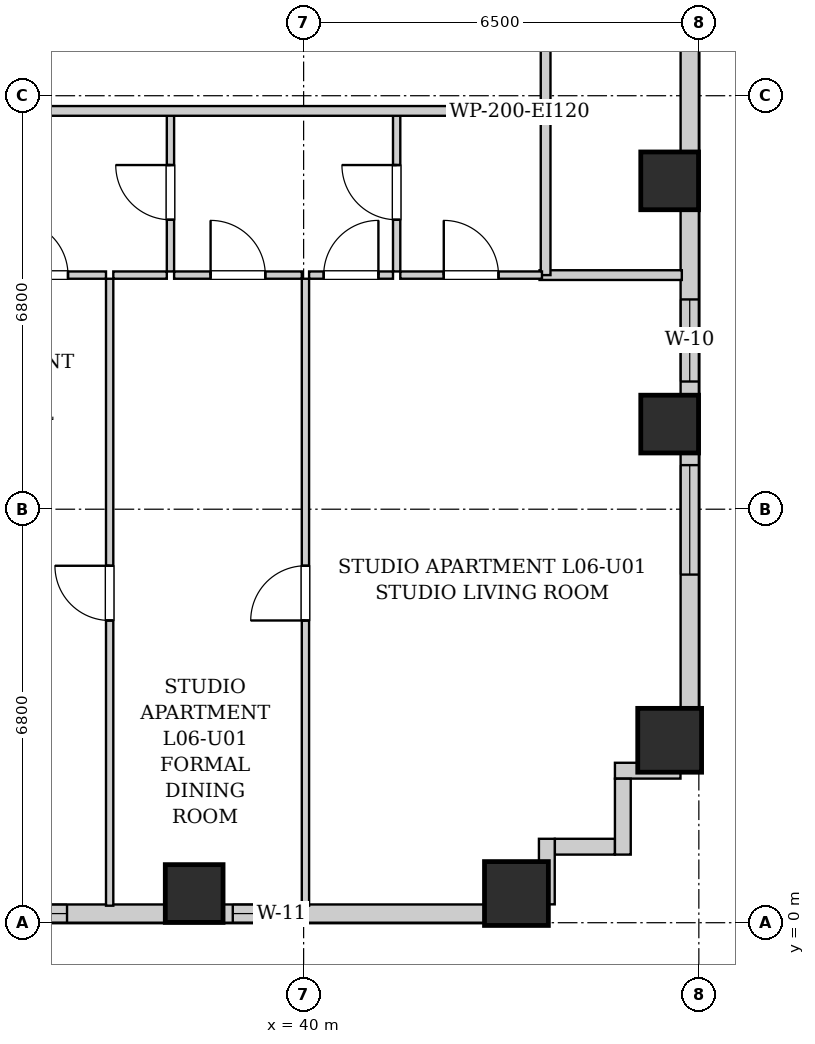
"""IFC4 building model, lengths in metres.
Left out: names, types, materials, properties, quantities, classifications, styles, units other than length and angle.
Written with IfcOpenShell. Run it as: python <this file> out.ifc"""

import sys

from ifc_helpers import new_model, si_unit, direction, frame, frame_2d, origin, origin_2d, place, context, subcontext, project, spatial, rectangle, extrude, element, fill, save


model = new_model("IFC4")
c1 = context("Model", 3, precision=1e-05, world=origin(), true_north=direction((0.0, 1.0)))
c2 = subcontext(c1, "Body", "Model", "MODEL_VIEW")
j1 = project(units=[si_unit("LENGTHUNIT", "METRE"), si_unit("PLANEANGLEUNIT", "RADIAN")], contexts=[c1])
p1 = place(None, origin())
s1 = spatial("IfcSite", under=j1, at=p1, CompositionType="ELEMENT")
p2 = place(p1, origin())
s2 = spatial("IfcBuilding", under=s1, at=p2, CompositionType="ELEMENT")
p3 = place(p2, frame((0.0, 0.0, 29.0)))
s3 = spatial("IfcBuildingStorey", under=s2, at=p3, CompositionType="ELEMENT", Elevation=29.0)
p4 = place(p3, frame((38.2, 0.48, 0.0), z_axis=(0.0, 0.0, 1.0), x_axis=(1.0, 0.0, 0.0)))
e1 = element("IfcColumn", 1, at=p4, inside=s3, PredefinedType="COLUMN", context=c2, shape_type="SweptSolid", body=[
    extrude(rectangle(XDim=0.95, YDim=0.95, at=origin_2d()), origin(), (0.0, 0.0, 1.0), 3.2),
])
for number, where, z_axis, x_axis in (
    (2, (43.5, 0.48, 0.0), (0.0, 0.0, 1.0), (1.0, 0.0, 0.0)),
    (3, (46.02, 3.0, 0.0), (0.0, 0.0, 1.0), (1.0, 0.0, 0.0)),
):
    element("IfcColumn", number, at=place(p3, frame(where, z_axis=z_axis, x_axis=x_axis)), inside=s3, PredefinedType="COLUMN", context=c2, shape_type="SweptSolid", body=[
        extrude(rectangle(XDim=1.05, YDim=1.05, at=origin_2d()), origin(), (0.0, 0.0, 1.0), 3.2),
    ])
for number, where, z_axis, x_axis in (
    (4, (46.02, 8.2, 0.0), (0.0, 0.0, 1.0), (1.0, 0.0, 0.0)),
    (5, (46.02, 12.2, 0.0), (0.0, 0.0, 1.0), (1.0, 0.0, 0.0)),
):
    element("IfcColumn", number, at=place(p3, frame(where, z_axis=z_axis, x_axis=x_axis)), inside=s3, PredefinedType="COLUMN", context=c2, shape_type="SweptSolid", body=[
        extrude(rectangle(XDim=0.95, YDim=0.95, at=origin_2d()), origin(), (0.0, 0.0, 1.0), 3.2),
    ])
p5 = place(p3, frame((46.35, 45.1, 0.0), z_axis=(0.0, 0.0, 1.0), x_axis=(0.0, -1.0, 0.0)))
e6 = element("IfcWall", 6, at=p5, inside=s3, PredefinedType="SOLIDWALL", context=c2, shape_type="SweptSolid", body=[
    extrude(rectangle(XDim=42.6, YDim=0.3, at=frame_2d((21.3, 0.0))), origin(), (0.0, 0.0, 1.0), 1.975),
])
p6 = place(p5, frame((37.575, 0.0, 0.55)))
e7 = element("IfcOpeningElement", 7, at=p6, cuts=e6, PredefinedType="OPENING", context=c2, shape_type="SweptSolid", body=[
    extrude(rectangle(XDim=1.8, YDim=1.2, at=frame_2d((0.9, 0.6))), frame((0.0, 0.16, 0.0), z_axis=(0.0, -1.0, 0.0), x_axis=(1.0, 0.0, 0.0)), (0.0, 0.0, 1.0), 0.32),
])
p7 = place(p5, frame((34.85, 0.0, 0.55)))
e8 = element("IfcOpeningElement", 8, at=p7, cuts=e6, PredefinedType="OPENING", context=c2, shape_type="SweptSolid", body=[
    extrude(rectangle(XDim=1.35, YDim=1.2, at=frame_2d((0.675, 0.6))), frame((0.0, 0.16, 0.0), z_axis=(0.0, -1.0, 0.0), x_axis=(1.0, 0.0, 0.0)), (0.0, 0.0, 1.0), 0.32),
])
p8 = place(p5, frame((3.665, 0.0, 0.55)))
e9 = element("IfcOpeningElement", 9, at=p8, cuts=e6, PredefinedType="OPENING", context=c2, shape_type="SweptSolid", body=[
    extrude(rectangle(XDim=1.8, YDim=1.2, at=frame_2d((0.9, 0.6))), frame((0.0, 0.16, 0.0), z_axis=(0.0, -1.0, 0.0), x_axis=(1.0, 0.0, 0.0)), (0.0, 0.0, 1.0), 0.32),
])
p9 = place(p5, frame((1.185, 0.0, 0.55)))
e10 = element("IfcOpeningElement", 10, at=p9, cuts=e6, PredefinedType="OPENING", context=c2, shape_type="SweptSolid", body=[
    extrude(rectangle(XDim=1.35, YDim=1.2, at=frame_2d((0.675, 0.6))), frame((0.0, 0.16, 0.0), z_axis=(0.0, -1.0, 0.0), x_axis=(1.0, 0.0, 0.0)), (0.0, 0.0, 1.0), 0.32),
])
p10 = place(p5, frame((27.225, 0.0, 0.55)))
e11 = element("IfcOpeningElement", 11, at=p10, cuts=e6, PredefinedType="OPENING", context=c2, shape_type="SweptSolid", body=[
    extrude(rectangle(XDim=1.8, YDim=1.2, at=frame_2d((0.9, 0.6))), frame((0.0, 0.16, 0.0), z_axis=(0.0, -1.0, 0.0), x_axis=(1.0, 0.0, 0.0)), (0.0, 0.0, 1.0), 0.32),
])
p11 = place(p5, frame((17.1, 0.0, 0.55)))
e12 = element("IfcOpeningElement", 12, at=p11, cuts=e6, PredefinedType="OPENING", context=c2, shape_type="SweptSolid", body=[
    extrude(rectangle(XDim=1.8, YDim=1.2, at=frame_2d((0.9, 0.6))), frame((0.0, 0.16, 0.0), z_axis=(0.0, -1.0, 0.0), x_axis=(1.0, 0.0, 0.0)), (0.0, 0.0, 1.0), 0.32),
])
p12 = place(p3, frame((44.0, 0.15, 0.0), z_axis=(0.0, 0.0, 1.0), x_axis=(-1.0, 0.0, 0.0)))
e13 = element("IfcWall", 13, at=p12, inside=s3, PredefinedType="SOLIDWALL", context=c2, shape_type="SweptSolid", body=[
    extrude(rectangle(XDim=28.1, YDim=0.3, at=frame_2d((14.05, 0.0))), origin(), (0.0, 0.0, 1.0), 1.975),
])
p13 = place(p12, frame((26.835, 0.0, 0.55)))
e14 = element("IfcOpeningElement", 14, at=p13, cuts=e13, PredefinedType="OPENING", context=c2, shape_type="SweptSolid", body=[
    extrude(rectangle(XDim=0.85, YDim=1.2, at=frame_2d((0.425, 0.6))), frame((0.0, 0.16, 0.0), z_axis=(0.0, -1.0, 0.0), x_axis=(1.0, 0.0, 0.0)), (0.0, 0.0, 1.0), 0.32),
])
p14 = place(p12, frame((23.765, 0.0, 0.55)))
e15 = element("IfcOpeningElement", 15, at=p14, cuts=e13, PredefinedType="OPENING", context=c2, shape_type="SweptSolid", body=[
    extrude(rectangle(XDim=1.8, YDim=1.2, at=frame_2d((0.9, 0.6))), frame((0.0, 0.16, 0.0), z_axis=(0.0, -1.0, 0.0), x_axis=(1.0, 0.0, 0.0)), (0.0, 0.0, 1.0), 0.32),
])
p15 = place(p12, frame((21.5, 0.0, 0.55)))
e16 = element("IfcOpeningElement", 16, at=p15, cuts=e13, PredefinedType="OPENING", context=c2, shape_type="SweptSolid", body=[
    extrude(rectangle(XDim=1.35, YDim=1.2, at=frame_2d((0.675, 0.6))), frame((0.0, 0.16, 0.0), z_axis=(0.0, -1.0, 0.0), x_axis=(1.0, 0.0, 0.0)), (0.0, 0.0, 1.0), 0.32),
])
p16 = place(p12, frame((14.352, 0.0, 0.55)))
e17 = element("IfcOpeningElement", 17, at=p16, cuts=e13, PredefinedType="OPENING", context=c2, shape_type="SweptSolid", body=[
    extrude(rectangle(XDim=1.8, YDim=1.2, at=frame_2d((0.9, 0.6))), frame((0.0, 0.16, 0.0), z_axis=(0.0, -1.0, 0.0), x_axis=(1.0, 0.0, 0.0)), (0.0, 0.0, 1.0), 0.32),
])
p17 = place(p12, frame((11.435, 0.0, 0.55)))
e18 = element("IfcOpeningElement", 18, at=p17, cuts=e13, PredefinedType="OPENING", context=c2, shape_type="SweptSolid", body=[
    extrude(rectangle(XDim=1.8, YDim=1.2, at=frame_2d((0.9, 0.6))), frame((0.0, 0.16, 0.0), z_axis=(0.0, -1.0, 0.0), x_axis=(1.0, 0.0, 0.0)), (0.0, 0.0, 1.0), 0.32),
])
p18 = place(p12, frame((7.891, 0.0, 0.55)))
e19 = element("IfcOpeningElement", 19, at=p18, cuts=e13, PredefinedType="OPENING", context=c2, shape_type="SweptSolid", body=[
    extrude(rectangle(XDim=1.8, YDim=1.2, at=frame_2d((0.9, 0.6))), frame((0.0, 0.16, 0.0), z_axis=(0.0, -1.0, 0.0), x_axis=(1.0, 0.0, 0.0)), (0.0, 0.0, 1.0), 0.32),
])
p19 = place(p12, frame((4.315, 0.0, 0.55)))
e20 = element("IfcOpeningElement", 20, at=p19, cuts=e13, PredefinedType="OPENING", context=c2, shape_type="SweptSolid", body=[
    extrude(rectangle(XDim=0.85, YDim=1.2, at=frame_2d((0.425, 0.6))), frame((0.0, 0.16, 0.0), z_axis=(0.0, -1.0, 0.0), x_axis=(1.0, 0.0, 0.0)), (0.0, 0.0, 1.0), 0.32),
])
p20 = place(p3, frame((46.198, 2.5, 0.0), z_axis=(0.0, 0.0, 1.0), x_axis=(-1.0, 0.0, 0.0)))
e21 = element("IfcWall", 21, at=p20, inside=s3, PredefinedType="SOLIDWALL", context=c2, shape_type="SweptSolid", body=[
    extrude(rectangle(XDim=1.078, YDim=0.26, at=frame_2d((0.539, 0.0))), origin(), (0.0, 0.0, 1.0), 2.94),
])
p21 = place(p3, frame((45.25, 2.368, 0.0), z_axis=(0.0, 0.0, 1.0), x_axis=(0.0, -1.0, 0.0)))
e22 = element("IfcWall", 22, at=p21, inside=s3, PredefinedType="SOLIDWALL", context=c2, shape_type="SweptSolid", body=[
    extrude(rectangle(XDim=1.248, YDim=0.26, at=frame_2d((0.624, 0.0))), origin(), (0.0, 0.0, 1.0), 2.94),
])
p22 = place(p3, frame((45.118, 1.25, 0.0), z_axis=(0.0, 0.0, 1.0), x_axis=(-1.0, 0.0, 0.0)))
e23 = element("IfcWall", 23, at=p22, inside=s3, PredefinedType="SOLIDWALL", context=c2, shape_type="SweptSolid", body=[
    extrude(rectangle(XDim=0.986, YDim=0.26, at=frame_2d((0.493, 0.0))), origin(), (0.0, 0.0, 1.0), 2.94),
])
p23 = place(p3, frame((44.0, 1.38, 0.0), z_axis=(0.0, 0.0, 1.0), x_axis=(0.0, -1.0, 0.0)))
e24 = element("IfcWall", 24, at=p23, inside=s3, PredefinedType="SOLIDWALL", context=c2, shape_type="SweptSolid", body=[
    extrude(rectangle(XDim=1.078, YDim=0.26, at=frame_2d((0.539, 0.0))), origin(), (0.0, 0.0, 1.0), 2.94),
])
p24 = place(p3, frame((43.98, 13.35, 0.0), z_axis=(0.0, 0.0, 1.0), x_axis=(0.0, 1.0, 0.0)))
e25 = element("IfcWall", 25, at=p24, inside=s3, PredefinedType="PARTITIONING", context=c2, shape_type="SweptSolid", body=[
    extrude(rectangle(XDim=1.74, YDim=0.16, at=frame_2d((0.87, 0.0))), origin(), (0.0, 0.0, 1.0), 2.94),
])
p25 = place(p3, frame((43.88, 10.65, 0.0), z_axis=(0.0, 0.0, 1.0), x_axis=(1.0, 0.0, 0.0)))
e26 = element("IfcWall", 26, at=p25, inside=s3, PredefinedType="PARTITIONING", context=c2, shape_type="SweptSolid", body=[
    extrude(rectangle(XDim=2.34, YDim=0.16, at=frame_2d((1.17, 0.0))), origin(), (0.0, 0.0, 1.0), 2.94),
])
p26 = place(p3, frame((43.98, 10.65, 0.0), z_axis=(0.0, 0.0, 1.0), x_axis=(0.0, 1.0, 0.0)))
e27 = element("IfcWall", 27, at=p26, inside=s3, PredefinedType="PARTITIONING", context=c2, shape_type="SweptSolid", body=[
    extrude(rectangle(XDim=2.66, YDim=0.16, at=frame_2d((1.33, 0.0))), origin(), (0.0, 0.0, 1.0), 2.94),
])
p27 = place(p3, frame((37.81, 10.71, 0.0), z_axis=(0.0, 0.0, 1.0), x_axis=(0.0, 1.0, 0.0)))
e28 = element("IfcWall", 28, at=p27, inside=s3, PredefinedType="PARTITIONING", context=c2, shape_type="SweptSolid", body=[
    extrude(rectangle(XDim=2.6, YDim=0.12, at=frame_2d((1.3, 0.0))), origin(), (0.0, 0.0, 1.0), 2.94),
])
p28 = place(p27, frame((0.85, 0.0, 0.0)))
e29 = element("IfcOpeningElement", 29, at=p28, cuts=e28, PredefinedType="OPENING", context=c2, shape_type="SweptSolid", body=[
    extrude(rectangle(XDim=0.9, YDim=2.05, at=frame_2d((0.45, 1.025))), frame((0.0, 0.07, 0.0), z_axis=(0.0, -1.0, 0.0), x_axis=(1.0, 0.0, 0.0)), (0.0, 0.0, 1.0), 0.14),
])
p29 = place(p3, frame((34.6, 10.65, 0.0), z_axis=(0.0, 0.0, 1.0), x_axis=(1.0, 0.0, 0.0)))
e30 = element("IfcWall", 30, at=p29, inside=s3, PredefinedType="PARTITIONING", context=c2, shape_type="SweptSolid", body=[
    extrude(rectangle(XDim=2.15, YDim=0.12, at=frame_2d((1.075, 0.0))), origin(), (0.0, 0.0, 1.0), 2.94),
])
p30 = place(p29, frame((0.625, 0.0, 0.0)))
e31 = element("IfcOpeningElement", 31, at=p30, cuts=e30, PredefinedType="OPENING", context=c2, shape_type="SweptSolid", body=[
    extrude(rectangle(XDim=0.9, YDim=2.05, at=frame_2d((0.45, 1.025))), frame((0.0, 0.07, 0.0), z_axis=(0.0, -1.0, 0.0), x_axis=(1.0, 0.0, 0.0)), (0.0, 0.0, 1.0), 0.14),
])
p31 = place(p3, frame((36.87, 10.65, 0.0), z_axis=(0.0, 0.0, 1.0), x_axis=(1.0, 0.0, 0.0)))
e32 = element("IfcWall", 32, at=p31, inside=s3, PredefinedType="PARTITIONING", context=c2, shape_type="SweptSolid", body=[
    extrude(rectangle(XDim=0.88, YDim=0.12, at=frame_2d((0.44, 0.0))), origin(), (0.0, 0.0, 1.0), 2.94),
])
p32 = place(p3, frame((41.53, 10.71, 0.0), z_axis=(0.0, 0.0, 1.0), x_axis=(0.0, 1.0, 0.0)))
e33 = element("IfcWall", 33, at=p32, inside=s3, PredefinedType="PARTITIONING", context=c2, shape_type="SweptSolid", body=[
    extrude(rectangle(XDim=2.6, YDim=0.12, at=frame_2d((1.3, 0.0))), origin(), (0.0, 0.0, 1.0), 2.94),
])
p33 = place(p32, frame((0.85, 0.0, 0.0)))
e34 = element("IfcOpeningElement", 34, at=p33, cuts=e33, PredefinedType="OPENING", context=c2, shape_type="SweptSolid", body=[
    extrude(rectangle(XDim=0.9, YDim=2.05, at=frame_2d((0.45, 1.025))), frame((0.0, 0.07, 0.0), z_axis=(0.0, -1.0, 0.0), x_axis=(1.0, 0.0, 0.0)), (0.0, 0.0, 1.0), 0.14),
])
p34 = place(p3, frame((37.87, 10.65, 0.0), z_axis=(0.0, 0.0, 1.0), x_axis=(1.0, 0.0, 0.0)))
e35 = element("IfcWall", 35, at=p34, inside=s3, PredefinedType="PARTITIONING", context=c2, shape_type="SweptSolid", body=[
    extrude(rectangle(XDim=2.1, YDim=0.12, at=frame_2d((1.05, 0.0))), origin(), (0.0, 0.0, 1.0), 2.94),
])
p35 = place(p34, frame((0.6, 0.0, 0.0)))
e36 = element("IfcOpeningElement", 36, at=p35, cuts=e35, PredefinedType="OPENING", context=c2, shape_type="SweptSolid", body=[
    extrude(rectangle(XDim=0.9, YDim=2.05, at=frame_2d((0.45, 1.025))), frame((0.0, 0.07, 0.0), z_axis=(0.0, -1.0, 0.0), x_axis=(1.0, 0.0, 0.0)), (0.0, 0.0, 1.0), 0.14),
])
p36 = place(p3, frame((40.09, 10.65, 0.0), z_axis=(0.0, 0.0, 1.0), x_axis=(1.0, 0.0, 0.0)))
e37 = element("IfcWall", 37, at=p36, inside=s3, PredefinedType="PARTITIONING", context=c2, shape_type="SweptSolid", body=[
    extrude(rectangle(XDim=1.38, YDim=0.12, at=frame_2d((0.69, 0.0))), origin(), (0.0, 0.0, 1.0), 2.94),
])
p37 = place(p36, frame((0.24, 0.0, 0.0)))
e38 = element("IfcOpeningElement", 38, at=p37, cuts=e37, PredefinedType="OPENING", context=c2, shape_type="SweptSolid", body=[
    extrude(rectangle(XDim=0.9, YDim=2.05, at=frame_2d((0.45, 1.025))), frame((0.0, 0.07, 0.0), z_axis=(0.0, -1.0, 0.0), x_axis=(1.0, 0.0, 0.0)), (0.0, 0.0, 1.0), 0.14),
])
p38 = place(p3, frame((41.59, 10.65, 0.0), z_axis=(0.0, 0.0, 1.0), x_axis=(1.0, 0.0, 0.0)))
e39 = element("IfcWall", 39, at=p38, inside=s3, PredefinedType="PARTITIONING", context=c2, shape_type="SweptSolid", body=[
    extrude(rectangle(XDim=2.33, YDim=0.12, at=frame_2d((1.165, 0.0))), origin(), (0.0, 0.0, 1.0), 2.94),
])
p39 = place(p38, frame((0.715, 0.0, 0.0)))
e40 = element("IfcOpeningElement", 40, at=p39, cuts=e39, PredefinedType="OPENING", context=c2, shape_type="SweptSolid", body=[
    extrude(rectangle(XDim=0.9, YDim=2.05, at=frame_2d((0.45, 1.025))), frame((0.0, 0.07, 0.0), z_axis=(0.0, -1.0, 0.0), x_axis=(1.0, 0.0, 0.0)), (0.0, 0.0, 1.0), 0.14),
])
p40 = place(p3, frame((36.81, 0.28, 0.0), z_axis=(0.0, 0.0, 1.0), x_axis=(0.0, 1.0, 0.0)))
e41 = element("IfcWall", 41, at=p40, inside=s3, PredefinedType="PARTITIONING", context=c2, shape_type="SweptSolid", body=[
    extrude(rectangle(XDim=10.31, YDim=0.12, at=frame_2d((5.155, 0.0))), origin(), (0.0, 0.0, 1.0), 2.94),
])
p41 = place(p40, frame((4.69, 0.0, 0.0)))
e42 = element("IfcOpeningElement", 42, at=p41, cuts=e41, PredefinedType="OPENING", context=c2, shape_type="SweptSolid", body=[
    extrude(rectangle(XDim=0.9, YDim=2.05, at=frame_2d((0.45, 1.025))), frame((0.0, 0.07, 0.0), z_axis=(0.0, -1.0, 0.0), x_axis=(1.0, 0.0, 0.0)), (0.0, 0.0, 1.0), 0.14),
])
p42 = place(p3, frame((40.03, 0.28, 0.0), z_axis=(0.0, 0.0, 1.0), x_axis=(0.0, 1.0, 0.0)))
e43 = element("IfcWall", 43, at=p42, inside=s3, PredefinedType="PARTITIONING", context=c2, shape_type="SweptSolid", body=[
    extrude(rectangle(XDim=10.31, YDim=0.12, at=frame_2d((5.155, 0.0))), origin(), (0.0, 0.0, 1.0), 2.94),
])
p43 = place(p42, frame((4.69, 0.0, 0.0)))
e44 = element("IfcOpeningElement", 44, at=p43, cuts=e43, PredefinedType="OPENING", context=c2, shape_type="SweptSolid", body=[
    extrude(rectangle(XDim=0.9, YDim=2.05, at=frame_2d((0.45, 1.025))), frame((0.0, 0.07, 0.0), z_axis=(0.0, -1.0, 0.0), x_axis=(1.0, 0.0, 0.0)), (0.0, 0.0, 1.0), 0.14),
])
p44 = place(p3, frame((10.05, 13.35, 0.0), z_axis=(0.0, 0.0, 1.0), x_axis=(1.0, 0.0, 0.0)))
e45 = element("IfcWall", 45, at=p44, inside=s3, PredefinedType="PARTITIONING", context=c2, shape_type="SweptSolid", body=[
    extrude(rectangle(XDim=33.9, YDim=0.16, at=frame_2d((16.95, 0.0))), origin(), (0.0, 0.0, 1.0), 2.94),
])
p45 = place(p44, frame((4.165, 0.0, 0.0)))
e46 = element("IfcOpeningElement", 46, at=p45, cuts=e45, PredefinedType="OPENING", context=c2, shape_type="SweptSolid", body=[
    extrude(rectangle(XDim=0.95, YDim=2.1, at=frame_2d((0.475, 1.05))), frame((0.0, 0.09, 0.0), z_axis=(0.0, -1.0, 0.0), x_axis=(1.0, 0.0, 0.0)), (0.0, 0.0, 1.0), 0.18),
])
p46 = place(p28, origin())
e47 = element("IfcDoor", 47, at=p46, inside=s3, OperationType="SINGLE_SWING_RIGHT", PredefinedType="DOOR", context=c2, shape_type="SweptSolid", body=[
    extrude(rectangle(XDim=0.9, YDim=2.05, at=frame_2d((0.45, 1.025))), frame((0.0, 0.025, 0.0), z_axis=(0.0, -1.0, 0.0), x_axis=(1.0, 0.0, 0.0)), (0.0, 0.0, 1.0), 0.05),
])
fill(e29, e47)
p47 = place(p30, origin())
e48 = element("IfcDoor", 48, at=p47, inside=s3, OperationType="SINGLE_SWING_LEFT", PredefinedType="DOOR", context=c2, shape_type="SweptSolid", body=[
    extrude(rectangle(XDim=0.9, YDim=2.05, at=frame_2d((0.45, 1.025))), frame((0.0, 0.025, 0.0), z_axis=(0.0, -1.0, 0.0), x_axis=(1.0, 0.0, 0.0)), (0.0, 0.0, 1.0), 0.05),
])
fill(e31, e48)
p48 = place(p33, origin())
e49 = element("IfcDoor", 49, at=p48, inside=s3, OperationType="SINGLE_SWING_RIGHT", PredefinedType="DOOR", context=c2, shape_type="SweptSolid", body=[
    extrude(rectangle(XDim=0.9, YDim=2.05, at=frame_2d((0.45, 1.025))), frame((0.0, 0.025, 0.0), z_axis=(0.0, -1.0, 0.0), x_axis=(1.0, 0.0, 0.0)), (0.0, 0.0, 1.0), 0.05),
])
fill(e34, e49)
p49 = place(p35, origin())
e50 = element("IfcDoor", 50, at=p49, inside=s3, OperationType="SINGLE_SWING_LEFT", PredefinedType="DOOR", context=c2, shape_type="SweptSolid", body=[
    extrude(rectangle(XDim=0.9, YDim=2.05, at=frame_2d((0.45, 1.025))), frame((0.0, 0.025, 0.0), z_axis=(0.0, -1.0, 0.0), x_axis=(1.0, 0.0, 0.0)), (0.0, 0.0, 1.0), 0.05),
])
fill(e36, e50)
p50 = place(p37, origin())
e51 = element("IfcDoor", 51, at=p50, inside=s3, OperationType="SINGLE_SWING_RIGHT", PredefinedType="DOOR", context=c2, shape_type="SweptSolid", body=[
    extrude(rectangle(XDim=0.9, YDim=2.05, at=frame_2d((0.45, 1.025))), frame((0.0, 0.025, 0.0), z_axis=(0.0, -1.0, 0.0), x_axis=(1.0, 0.0, 0.0)), (0.0, 0.0, 1.0), 0.05),
])
fill(e38, e51)
p51 = place(p39, origin())
e52 = element("IfcDoor", 52, at=p51, inside=s3, OperationType="SINGLE_SWING_LEFT", PredefinedType="DOOR", context=c2, shape_type="SweptSolid", body=[
    extrude(rectangle(XDim=0.9, YDim=2.05, at=frame_2d((0.45, 1.025))), frame((0.0, 0.025, 0.0), z_axis=(0.0, -1.0, 0.0), x_axis=(1.0, 0.0, 0.0)), (0.0, 0.0, 1.0), 0.05),
])
fill(e40, e52)
p52 = place(p41, origin())
e53 = element("IfcDoor", 53, at=p52, inside=s3, OperationType="SINGLE_SWING_RIGHT", PredefinedType="DOOR", context=c2, shape_type="SweptSolid", body=[
    extrude(rectangle(XDim=0.9, YDim=2.05, at=frame_2d((0.45, 1.025))), frame((0.0, 0.025, 0.0), z_axis=(0.0, -1.0, 0.0), x_axis=(1.0, 0.0, 0.0)), (0.0, 0.0, 1.0), 0.05),
])
fill(e42, e53)
p53 = place(p43, origin())
e54 = element("IfcDoor", 54, at=p53, inside=s3, OperationType="SINGLE_SWING_LEFT", PredefinedType="DOOR", context=c2, shape_type="SweptSolid", body=[
    extrude(rectangle(XDim=0.9, YDim=2.05, at=frame_2d((0.45, 1.025))), frame((0.0, 0.025, 0.0), z_axis=(0.0, -1.0, 0.0), x_axis=(1.0, 0.0, 0.0)), (0.0, 0.0, 1.0), 0.05),
])
fill(e44, e54)
p54 = place(p18, origin())
e55 = element("IfcWindow", 55, at=p54, inside=s3, PartitioningType="DOUBLE_PANEL_VERTICAL", PredefinedType="WINDOW", context=c2, shape_type="SweptSolid", body=[
    extrude(rectangle(XDim=1.8, YDim=1.2, at=frame_2d((0.9, 0.6))), frame((0.0, 0.03, 0.0), z_axis=(0.0, -1.0, 0.0), x_axis=(1.0, 0.0, 0.0)), (0.0, 0.0, 1.0), 0.06),
])
fill(e19, e55)
p55 = place(p19, origin())
e56 = element("IfcWindow", 56, at=p55, inside=s3, PartitioningType="SINGLE_PANEL", PredefinedType="WINDOW", context=c2, shape_type="SweptSolid", body=[
    extrude(rectangle(XDim=0.85, YDim=1.2, at=frame_2d((0.425, 0.6))), frame((0.0, 0.03, 0.0), z_axis=(0.0, -1.0, 0.0), x_axis=(1.0, 0.0, 0.0)), (0.0, 0.0, 1.0), 0.06),
])
fill(e20, e56)
p56 = place(p6, origin())
e57 = element("IfcWindow", 57, at=p56, inside=s3, PartitioningType="DOUBLE_PANEL_VERTICAL", PredefinedType="WINDOW", context=c2, shape_type="SweptSolid", body=[
    extrude(rectangle(XDim=1.8, YDim=1.2, at=frame_2d((0.9, 0.6))), frame((0.0, 0.03, 0.0), z_axis=(0.0, -1.0, 0.0), x_axis=(1.0, 0.0, 0.0)), (0.0, 0.0, 1.0), 0.06),
])
fill(e7, e57)
p57 = place(p7, origin())
e58 = element("IfcWindow", 58, at=p57, inside=s3, PartitioningType="SINGLE_PANEL", PredefinedType="WINDOW", context=c2, shape_type="SweptSolid", body=[
    extrude(rectangle(XDim=1.35, YDim=1.2, at=frame_2d((0.675, 0.6))), frame((0.0, 0.03, 0.0), z_axis=(0.0, -1.0, 0.0), x_axis=(1.0, 0.0, 0.0)), (0.0, 0.0, 1.0), 0.06),
])
fill(e8, e58)
save(model, sys.argv[1])
